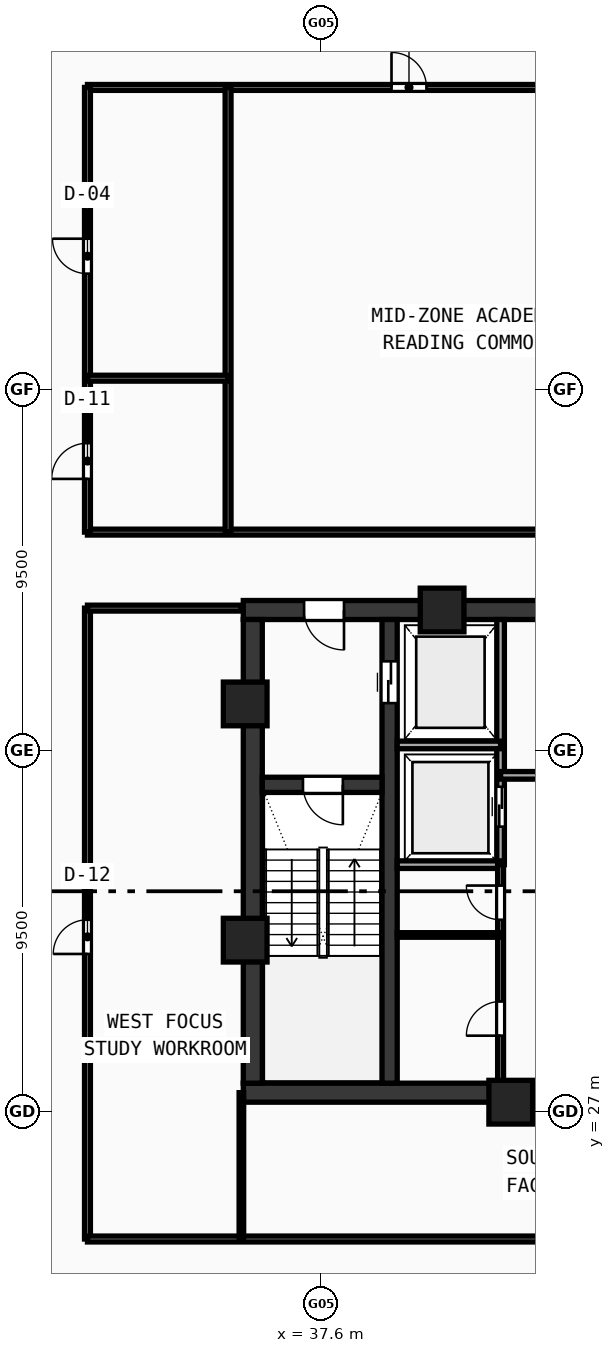
"""IFC4 building model, lengths in metres.
Left out: names, types, materials, properties, quantities, classifications, styles, units other than length and angle.
Written with IfcOpenShell. Run it as: python <this file> out.ifc"""

import sys

from ifc_helpers import new_model, si_unit, direction, frame, frame_2d, origin, origin_with_axes, origin_2d, place, context, subcontext, project, spatial, rectangle, hollow_rectangle, extrude, source, transform, mapped, element, fill, save


model = new_model("IFC4")
c1 = context("Model", 3, precision=1e-05, world=origin(), true_north=direction((0.0, 1.0)))
c2 = subcontext(c1, "Body", "Model", "MODEL_VIEW")
j1 = project(units=[si_unit("LENGTHUNIT", "METRE"), si_unit("PLANEANGLEUNIT", "RADIAN")], contexts=[c1])
p1 = place(None, origin())
s1 = spatial("IfcSite", under=j1, at=p1, CompositionType="ELEMENT")
p2 = place(p1, origin())
s2 = spatial("IfcBuilding", under=s1, at=p2, CompositionType="ELEMENT")
p3 = place(p2, frame((0.0, 0.0, 207.56)))
s3 = spatial("IfcBuildingStorey", under=s2, at=p3, CompositionType="ELEMENT", Elevation=207.56)
p4 = place(p3, frame((35.55, 27.5, 0.0), z_axis=(0.0, 0.0, 1.0), x_axis=(1.0, 0.0, 0.0)))
e1 = element("IfcWall", 1, at=p4, inside=s3, PredefinedType="SHEAR", context=c2, shape_type="SweptSolid", body=[
    extrude(rectangle(XDim=24.9, YDim=0.5, at=frame_2d((12.45, 0.0))), origin(), (0.0, 0.0, 1.0), 3.54),
])
p5 = place(p3, frame((35.55, 40.2, 0.0), z_axis=(0.0, 0.0, 1.0), x_axis=(1.0, 0.0, 0.0)))
e2 = element("IfcWall", 2, at=p5, inside=s3, PredefinedType="SHEAR", context=c2, shape_type="SweptSolid", body=[
    extrude(rectangle(XDim=11.25, YDim=0.5, at=frame_2d((5.625, 0.0))), origin(), (0.0, 0.0, 1.0), 3.54),
])
p6 = place(p5, frame((1.6, 0.0, 0.0)))
e3 = element("IfcOpeningElement", 3, at=p6, cuts=e2, PredefinedType="OPENING", context=c2, shape_type="SweptSolid", body=[
    extrude(rectangle(XDim=1.05, YDim=2.1, at=frame_2d((0.525, 1.05))), frame((0.0, 0.26, 0.0), z_axis=(0.0, -1.0, 0.0), x_axis=(1.0, 0.0, 0.0)), (0.0, 0.0, 1.0), 0.52),
])
p7 = place(p3, frame((35.8, 27.75, 0.0), z_axis=(0.0, 0.0, 1.0), x_axis=(0.0, 1.0, 0.0)))
e4 = element("IfcWall", 4, at=p7, inside=s3, PredefinedType="SHEAR", context=c2, shape_type="SweptSolid", body=[
    extrude(rectangle(XDim=12.2, YDim=0.5, at=frame_2d((6.1, 0.0))), origin(), (0.0, 0.0, 1.0), 3.54),
])
p8 = place(p3, frame((39.4, 27.75, 0.0), z_axis=(0.0, 0.0, 1.0), x_axis=(0.0, 1.0, 0.0)))
e5 = element("IfcWall", 5, at=p8, inside=s3, PredefinedType="SHEAR", context=c2, shape_type="SweptSolid", body=[
    extrude(rectangle(XDim=12.2, YDim=0.4, at=frame_2d((6.1, 0.0))), origin(), (0.0, 0.0, 1.0), 3.54),
])
p9 = place(p8, frame((10.0, 0.0, 0.0)))
e6 = element("IfcOpeningElement", 6, at=p9, cuts=e5, PredefinedType="OPENING", context=c2, shape_type="SweptSolid", body=[
    extrude(rectangle(XDim=1.1, YDim=2.1, at=frame_2d((0.55, 1.05))), frame((0.0, 0.21, 0.0), z_axis=(0.0, -1.0, 0.0), x_axis=(1.0, 0.0, 0.0)), (0.0, 0.0, 1.0), 0.42),
])
p10 = place(p3, frame((36.05, 35.6, 0.0), z_axis=(0.0, 0.0, 1.0), x_axis=(1.0, 0.0, 0.0)))
e7 = element("IfcWall", 7, at=p10, inside=s3, PredefinedType="SHEAR", context=c2, shape_type="SweptSolid", body=[
    extrude(rectangle(XDim=3.15, YDim=0.4, at=frame_2d((1.575, 0.0))), origin(), (0.0, 0.0, 1.0), 3.54),
])
p11 = place(p10, frame((1.07, 0.0, 0.0)))
e8 = element("IfcOpeningElement", 8, at=p11, cuts=e7, PredefinedType="OPENING", context=c2, shape_type="SweptSolid", body=[
    extrude(rectangle(XDim=1.05, YDim=2.1, at=frame_2d((0.525, 1.05))), frame((0.0, 0.21, 0.0), z_axis=(0.0, -1.0, 0.0), x_axis=(1.0, 0.0, 0.0)), (0.0, 0.0, 1.0), 0.42),
])
m1 = source(origin(), c2, "Body", "SweptSolid", [
    extrude(hollow_rectangle(XDim=1.15, YDim=1.15, WallThickness=0.048, at=origin_2d()), origin(), (0.0, 0.0, 1.0), 3.8),
])
for number, where, z_axis, x_axis in (
    (9, (42.588, 27.25, -0.26), (0.0, 0.0, 1.0), (1.0, 0.0, 0.0)),
    (10, (40.781, 40.2, -0.26), (0.0, 0.0, 1.0), (1.0, 0.0, 0.0)),
    (11, (35.6, 37.729, -0.26), (0.0, 0.0, 1.0), (1.0, 0.0, 0.0)),
    (12, (35.6, 31.513, -0.26), (0.0, 0.0, 1.0), (1.0, 0.0, 0.0)),
):
    element("IfcColumn", number, at=place(p3, frame(where, z_axis=z_axis, x_axis=x_axis)), inside=s3, PredefinedType="COLUMN", context=c2, shape_type="MappedRepresentation", body=[
        mapped(m1, transform((0.0, 0.0, 0.0), scale=1.0)),
    ])
p12 = place(p3, frame((42.32, 33.5, 0.0), z_axis=(0.0, 0.0, 1.0), x_axis=(0.0, 1.0, 0.0)))
e13 = element("IfcWall", 13, at=p12, inside=s3, PredefinedType="SOLIDWALL", context=c2, shape_type="SweptSolid", body=[
    extrude(rectangle(XDim=6.45, YDim=0.2, at=frame_2d((3.225, 0.0))), origin(), (0.0, 0.0, 1.0), 3.54),
])
p13 = place(p12, frame((1.0, 0.0, 0.0)))
e14 = element("IfcOpeningElement", 14, at=p13, cuts=e13, PredefinedType="OPENING", context=c2, shape_type="SweptSolid", body=[
    extrude(rectangle(XDim=1.05, YDim=2.1, at=frame_2d((0.525, 1.05))), frame((0.0, 0.11, 0.0), z_axis=(0.0, -1.0, 0.0), x_axis=(1.0, 0.0, 0.0)), (0.0, 0.0, 1.0), 0.22),
])
for number, where, z_axis, x_axis in (
    (15, (39.6, 36.65, 0.0), (0.0, 0.0, 1.0), (1.0, 0.0, 0.0)),
    (16, (39.6, 33.5, 0.0), (0.0, 0.0, 1.0), (1.0, 0.0, 0.0)),
):
    element("IfcWall", number, at=place(p3, frame(where, z_axis=z_axis, x_axis=x_axis)), inside=s3, PredefinedType="SOLIDWALL", context=c2, shape_type="SweptSolid", body=[
        extrude(rectangle(XDim=2.72, YDim=0.2, at=frame_2d((1.36, 0.0))), origin(), (0.0, 0.0, 1.0), 3.54),
    ])
p14 = place(p3, frame((42.32, 35.85, 0.0), z_axis=(0.0, 0.0, 1.0), x_axis=(1.0, 0.0, 0.0)))
e17 = element("IfcWall", 17, at=p14, inside=s3, PredefinedType="SOLIDWALL", context=c2, shape_type="SweptSolid", body=[
    extrude(rectangle(XDim=4.73, YDim=0.2, at=frame_2d((2.365, 0.0))), origin(), (0.0, 0.0, 1.0), 3.54),
])
p15 = place(p14, frame((1.8, 0.0, 0.0)))
e18 = element("IfcOpeningElement", 18, at=p15, cuts=e17, PredefinedType="OPENING", context=c2, shape_type="SweptSolid", body=[
    extrude(rectangle(XDim=0.9, YDim=2.1, at=frame_2d((0.45, 1.05))), frame((0.0, 0.11, 0.0), z_axis=(0.0, -1.0, 0.0), x_axis=(1.0, 0.0, 0.0)), (0.0, 0.0, 1.0), 0.22),
])
p16 = place(p3, frame((42.32, 27.6, 0.0), z_axis=(0.0, 0.0, 1.0), x_axis=(0.0, 1.0, 0.0)))
e19 = element("IfcWall", 19, at=p16, inside=s3, PredefinedType="PARTITIONING", context=c2, shape_type="SweptSolid", body=[
    extrude(rectangle(XDim=5.9, YDim=0.155, at=frame_2d((2.95, 0.0))), origin(), (0.0, 0.0, 1.0), 3.54),
])
p17 = place(p16, frame((1.4, 0.0, 0.0)))
e20 = element("IfcOpeningElement", 20, at=p17, cuts=e19, PredefinedType="OPENING", context=c2, shape_type="SweptSolid", body=[
    extrude(rectangle(XDim=0.9, YDim=2.1, at=frame_2d((0.45, 1.05))), frame((0.0, 0.087, 0.0), z_axis=(0.0, -1.0, 0.0), x_axis=(1.0, 0.0, 0.0)), (0.0, 0.0, 1.0), 0.175),
])
p18 = place(p16, frame((4.45, 0.0, 0.0)))
e21 = element("IfcOpeningElement", 21, at=p18, cuts=e19, PredefinedType="OPENING", context=c2, shape_type="SweptSolid", body=[
    extrude(rectangle(XDim=0.9, YDim=2.1, at=frame_2d((0.45, 1.05))), frame((0.0, 0.087, 0.0), z_axis=(0.0, -1.0, 0.0), x_axis=(1.0, 0.0, 0.0)), (0.0, 0.0, 1.0), 0.175),
])
p19 = place(p3, frame((39.6, 31.65, 0.0), z_axis=(0.0, 0.0, 1.0), x_axis=(1.0, 0.0, 0.0)))
e22 = element("IfcWall", 22, at=p19, inside=s3, PredefinedType="PARTITIONING", context=c2, shape_type="SweptSolid", body=[
    extrude(rectangle(XDim=2.72, YDim=0.12, at=frame_2d((1.36, 0.0))), origin(), (0.0, 0.0, 1.0), 3.54),
])
p20 = place(p3, frame((31.45, 42.25, 0.0), z_axis=(0.0, 0.0, 1.0), x_axis=(1.0, 0.0, 0.0)))
e23 = element("IfcWall", 23, at=p20, inside=s3, PredefinedType="PARTITIONING", context=c2, shape_type="SweptSolid", body=[
    extrude(rectangle(XDim=33.1, YDim=0.155, at=frame_2d((16.55, 0.0))), origin(), (0.0, 0.0, 1.0), 2.89),
])
p21 = place(p3, frame((31.45, 53.95, 0.0), z_axis=(0.0, 0.0, 1.0), x_axis=(1.0, 0.0, 0.0)))
e24 = element("IfcWall", 24, at=p21, inside=s3, PredefinedType="PARTITIONING", context=c2, shape_type="SweptSolid", body=[
    extrude(rectangle(XDim=33.1, YDim=0.155, at=frame_2d((16.55, 0.0))), origin(), (0.0, 0.0, 1.0), 2.89),
])
p22 = place(p21, frame((8.0, 0.0, 0.0)))
e25 = element("IfcOpeningElement", 25, at=p22, cuts=e24, PredefinedType="OPENING", context=c2, shape_type="SweptSolid", body=[
    extrude(rectangle(XDim=0.92, YDim=2.1, at=frame_2d((0.46, 1.05))), frame((0.0, 0.087, 0.0), z_axis=(0.0, -1.0, 0.0), x_axis=(1.0, 0.0, 0.0)), (0.0, 0.0, 1.0), 0.175),
])
p23 = place(p21, frame((19.85, 0.0, 0.0)))
e26 = element("IfcOpeningElement", 26, at=p23, cuts=e24, PredefinedType="OPENING", context=c2, shape_type="SweptSolid", body=[
    extrude(rectangle(XDim=0.92, YDim=2.1, at=frame_2d((0.46, 1.05))), frame((0.0, 0.087, 0.0), z_axis=(0.0, -1.0, 0.0), x_axis=(1.0, 0.0, 0.0)), (0.0, 0.0, 1.0), 0.175),
])
p24 = place(p3, frame((31.45, 42.25, 0.0), z_axis=(0.0, 0.0, 1.0), x_axis=(0.0, 1.0, 0.0)))
e27 = element("IfcWall", 27, at=p24, inside=s3, PredefinedType="PARTITIONING", context=c2, shape_type="SweptSolid", body=[
    extrude(rectangle(XDim=11.7, YDim=0.155, at=frame_2d((5.85, 0.0))), origin(), (0.0, 0.0, 1.0), 2.89),
])
p25 = place(p24, frame((1.4, 0.0, 0.0)))
e28 = element("IfcOpeningElement", 28, at=p25, cuts=e27, PredefinedType="OPENING", context=c2, shape_type="SweptSolid", body=[
    extrude(rectangle(XDim=0.94, YDim=2.1, at=frame_2d((0.47, 1.05))), frame((0.0, 0.087, 0.0), z_axis=(0.0, -1.0, 0.0), x_axis=(1.0, 0.0, 0.0)), (0.0, 0.0, 1.0), 0.175),
])
p26 = place(p24, frame((6.8, 0.0, 0.0)))
e29 = element("IfcOpeningElement", 29, at=p26, cuts=e27, PredefinedType="OPENING", context=c2, shape_type="SweptSolid", body=[
    extrude(rectangle(XDim=0.92, YDim=2.1, at=frame_2d((0.46, 1.05))), frame((0.0, 0.087, 0.0), z_axis=(0.0, -1.0, 0.0), x_axis=(1.0, 0.0, 0.0)), (0.0, 0.0, 1.0), 0.175),
])
p27 = place(p3, frame((35.15, 42.25, 0.0), z_axis=(0.0, 0.0, 1.0), x_axis=(0.0, 1.0, 0.0)))
e30 = element("IfcWall", 30, at=p27, inside=s3, PredefinedType="PARTITIONING", context=c2, shape_type="SweptSolid", body=[
    extrude(rectangle(XDim=11.7, YDim=0.155, at=frame_2d((5.85, 0.0))), origin(), (0.0, 0.0, 1.0), 2.89),
])
p28 = place(p3, frame((31.45, 46.3, 0.0), z_axis=(0.0, 0.0, 1.0), x_axis=(1.0, 0.0, 0.0)))
e31 = element("IfcWall", 31, at=p28, inside=s3, PredefinedType="PARTITIONING", context=c2, shape_type="SweptSolid", body=[
    extrude(rectangle(XDim=3.7, YDim=0.155, at=frame_2d((1.85, 0.0))), origin(), (0.0, 0.0, 1.0), 2.89),
])
p29 = place(p3, frame((31.45, 23.65, 0.0), z_axis=(0.0, 0.0, 1.0), x_axis=(0.0, 1.0, 0.0)))
e32 = element("IfcWall", 32, at=p29, inside=s3, PredefinedType="PARTITIONING", context=c2, shape_type="SweptSolid", body=[
    extrude(rectangle(XDim=16.6, YDim=0.155, at=frame_2d((8.3, 0.0))), origin(), (0.0, 0.0, 1.0), 2.89),
])
p30 = place(p29, frame((7.5, 0.0, 0.0)))
e33 = element("IfcOpeningElement", 33, at=p30, cuts=e32, PredefinedType="OPENING", context=c2, shape_type="SweptSolid", body=[
    extrude(rectangle(XDim=0.9, YDim=2.08, at=frame_2d((0.45, 1.04))), frame((0.0, 0.087, 0.0), z_axis=(0.0, -1.0, 0.0), x_axis=(1.0, 0.0, 0.0)), (0.0, 0.0, 1.0), 0.175),
])
p31 = place(p3, frame((31.45, 23.65, 0.0), z_axis=(0.0, 0.0, 1.0), x_axis=(1.0, 0.0, 0.0)))
e34 = element("IfcWall", 34, at=p31, inside=s3, PredefinedType="PARTITIONING", context=c2, shape_type="SweptSolid", body=[
    extrude(rectangle(XDim=33.1, YDim=0.155, at=frame_2d((16.55, 0.0))), origin(), (0.0, 0.0, 1.0), 2.89),
])
p32 = place(p31, frame((16.0, 0.0, 0.0)))
e35 = element("IfcOpeningElement", 35, at=p32, cuts=e34, PredefinedType="OPENING", context=c2, shape_type="SweptSolid", body=[
    extrude(rectangle(XDim=0.92, YDim=2.1, at=frame_2d((0.46, 1.05))), frame((0.0, 0.087, 0.0), z_axis=(0.0, -1.0, 0.0), x_axis=(1.0, 0.0, 0.0)), (0.0, 0.0, 1.0), 0.175),
])
p33 = place(p3, frame((31.45, 40.25, 0.0), z_axis=(0.0, 0.0, 1.0), x_axis=(1.0, 0.0, 0.0)))
e36 = element("IfcWall", 36, at=p33, inside=s3, PredefinedType="PARTITIONING", context=c2, shape_type="SweptSolid", body=[
    extrude(rectangle(XDim=4.05, YDim=0.155, at=frame_2d((2.025, 0.0))), origin(), (0.0, 0.0, 1.0), 3.54),
])
p34 = place(p3, frame((35.5, 23.65, 0.0), z_axis=(0.0, 0.0, 1.0), x_axis=(0.0, 1.0, 0.0)))
e37 = element("IfcWall", 37, at=p34, inside=s3, PredefinedType="PARTITIONING", context=c2, shape_type="SweptSolid", body=[
    extrude(rectangle(XDim=3.85, YDim=0.12, at=frame_2d((1.925, 0.0))), origin(), (0.0, 0.0, 1.0), 3.14),
])
m2 = source(origin(), c2, "Body", "SweptSolid", [
    extrude(rectangle(XDim=1.05, YDim=2.1, at=frame_2d((0.525, 1.05))), frame((0.0, 0.025, 0.0), z_axis=(0.0, -1.0, 0.0), x_axis=(1.0, 0.0, 0.0)), (0.0, 0.0, 1.0), 0.05),
])
p35 = place(p11, frame((1.05, 0.0, 0.0), z_axis=(0.0, 0.0, 1.0), x_axis=(-1.0, 0.0, 0.0)))
e38 = element("IfcDoor", 38, at=p35, inside=s3, OperationType="SINGLE_SWING_LEFT", PredefinedType="DOOR", context=c2, shape_type="MappedRepresentation", body=[
    mapped(m2, transform((0.0, 0.0, 0.0), scale=1.0)),
])
fill(e8, e38)
p36 = place(p6, frame((1.05, 0.0, 0.0), z_axis=(0.0, 0.0, 1.0), x_axis=(-1.0, 0.0, 0.0)))
e39 = element("IfcDoor", 39, at=p36, inside=s3, OperationType="SINGLE_SWING_LEFT", PredefinedType="DOOR", context=c2, shape_type="MappedRepresentation", body=[
    mapped(m2, transform((0.0, 0.0, 0.0), scale=1.0)),
])
fill(e3, e39)
m3 = source(origin(), c2, "Body", "SweptSolid", [
    extrude(rectangle(XDim=1.1, YDim=2.1, at=frame_2d((0.55, 1.05))), frame((0.0, 0.025, 0.0), z_axis=(0.0, -1.0, 0.0), x_axis=(1.0, 0.0, 0.0)), (0.0, 0.0, 1.0), 0.05),
])
p37 = place(p9, frame((1.1, 0.0, 0.0), z_axis=(0.0, 0.0, 1.0), x_axis=(-1.0, 0.0, 0.0)))
e40 = element("IfcDoor", 40, at=p37, inside=s3, OperationType="DOUBLE_DOOR_SLIDING", PredefinedType="DOOR", context=c2, shape_type="MappedRepresentation", body=[
    mapped(m3, transform((0.0, 0.0, 0.0), scale=1.0)),
])
fill(e6, e40)
p38 = place(p13, origin_with_axes())
e41 = element("IfcDoor", 41, at=p38, inside=s3, OperationType="DOUBLE_DOOR_SLIDING", PredefinedType="DOOR", context=c2, shape_type="MappedRepresentation", body=[
    mapped(m2, transform((0.0, 0.0, 0.0), scale=1.0)),
])
fill(e14, e41)
m4 = source(origin(), c2, "Body", "SweptSolid", [
    extrude(rectangle(XDim=0.9, YDim=2.1, at=frame_2d((0.45, 1.05))), frame((0.0, 0.025, 0.0), z_axis=(0.0, -1.0, 0.0), x_axis=(1.0, 0.0, 0.0)), (0.0, 0.0, 1.0), 0.05),
])
p39 = place(p17, origin_with_axes())
e42 = element("IfcDoor", 42, at=p39, inside=s3, OperationType="SINGLE_SWING_LEFT", PredefinedType="DOOR", context=c2, shape_type="MappedRepresentation", body=[
    mapped(m4, transform((0.0, 0.0, 0.0), scale=1.0)),
])
fill(e20, e42)
p40 = place(p18, origin_with_axes())
e43 = element("IfcDoor", 43, at=p40, inside=s3, OperationType="SINGLE_SWING_RIGHT", PredefinedType="DOOR", context=c2, shape_type="MappedRepresentation", body=[
    mapped(m4, transform((0.0, 0.0, 0.0), scale=1.0)),
])
fill(e21, e43)
m5 = source(origin(), c2, "Body", "SweptSolid", [
    extrude(rectangle(XDim=0.94, YDim=2.1, at=frame_2d((0.47, 1.05))), frame((0.0, 0.025, 0.0), z_axis=(0.0, -1.0, 0.0), x_axis=(1.0, 0.0, 0.0)), (0.0, 0.0, 1.0), 0.05),
])
p41 = place(p25, origin_with_axes())
e44 = element("IfcDoor", 44, at=p41, inside=s3, OperationType="SINGLE_SWING_LEFT", PredefinedType="DOOR", context=c2, shape_type="MappedRepresentation", body=[
    mapped(m5, transform((0.0, 0.0, 0.0), scale=1.0)),
])
fill(e28, e44)
m6 = source(origin(), c2, "Body", "SweptSolid", [
    extrude(rectangle(XDim=0.92, YDim=2.1, at=frame_2d((0.46, 1.05))), frame((0.0, 0.025, 0.0), z_axis=(0.0, -1.0, 0.0), x_axis=(1.0, 0.0, 0.0)), (0.0, 0.0, 1.0), 0.05),
])
p42 = place(p26, origin_with_axes())
e45 = element("IfcDoor", 45, at=p42, inside=s3, OperationType="SINGLE_SWING_RIGHT", PredefinedType="DOOR", context=c2, shape_type="MappedRepresentation", body=[
    mapped(m6, transform((0.0, 0.0, 0.0), scale=1.0)),
])
fill(e29, e45)
p43 = place(p22, origin_with_axes())
e46 = element("IfcDoor", 46, at=p43, inside=s3, OperationType="SINGLE_SWING_LEFT", PredefinedType="DOOR", context=c2, shape_type="MappedRepresentation", body=[
    mapped(m6, transform((0.0, 0.0, 0.0), scale=1.0)),
])
fill(e25, e46)
m7 = source(origin(), c2, "Body", "SweptSolid", [
    extrude(rectangle(XDim=0.9, YDim=2.08, at=frame_2d((0.45, 1.04))), frame((0.0, 0.025, 0.0), z_axis=(0.0, -1.0, 0.0), x_axis=(1.0, 0.0, 0.0)), (0.0, 0.0, 1.0), 0.05),
])
p44 = place(p30, origin_with_axes())
e47 = element("IfcDoor", 47, at=p44, inside=s3, OperationType="SINGLE_SWING_LEFT", PredefinedType="DOOR", context=c2, shape_type="MappedRepresentation", body=[
    mapped(m7, transform((0.0, 0.0, 0.0), scale=1.0)),
])
fill(e33, e47)
save(model, sys.argv[1])
